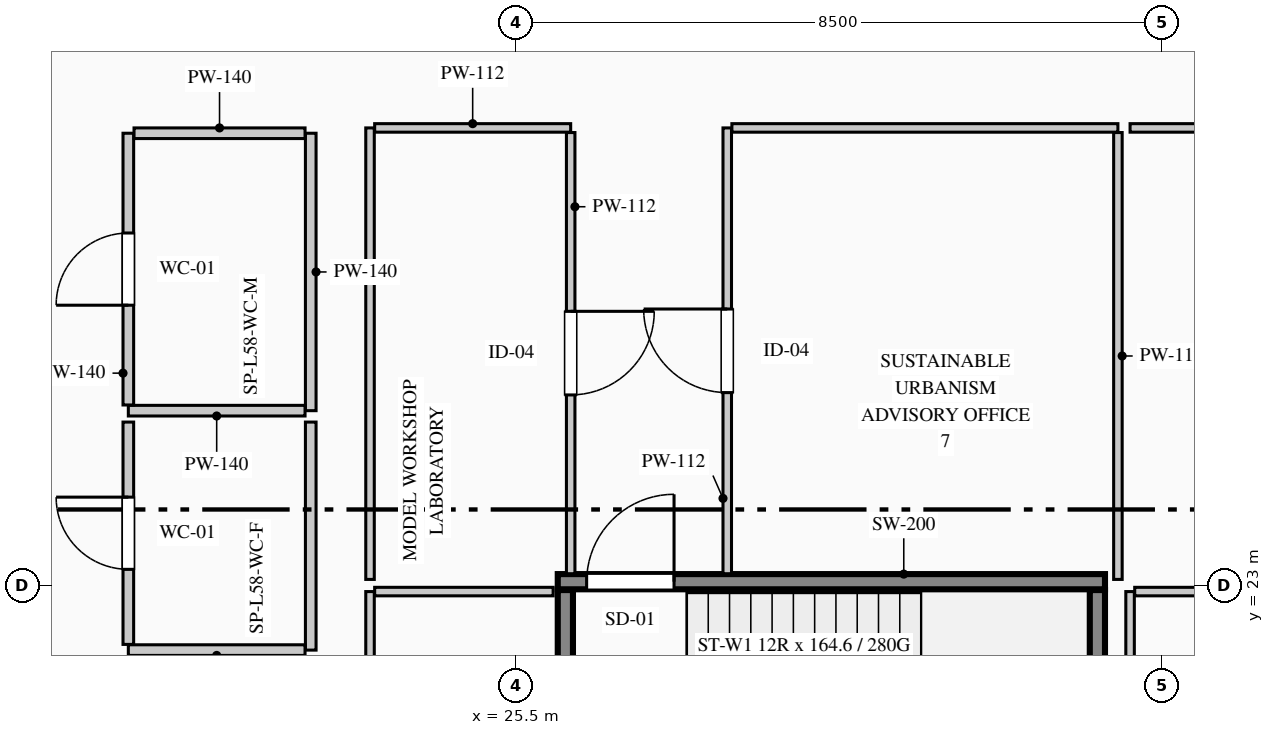
"""IFC4 building model, lengths in metres.
Left out: names, types, materials, properties, quantities, classifications, styles, units other than length and angle.
Written with IfcOpenShell. Run it as: python <this file> out.ifc"""

import sys

from ifc_helpers import new_model, si_unit, direction, frame, frame_2d, origin, place, context, subcontext, project, spatial, rectangle, extrude, element, fill, save


model = new_model("IFC4")
c1 = context("Model", 3, precision=1e-05, world=origin(), true_north=direction((0.0, 1.0)))
c2 = subcontext(c1, "Body", "Model", "MODEL_VIEW")
j1 = project(units=[si_unit("LENGTHUNIT", "METRE"), si_unit("PLANEANGLEUNIT", "RADIAN")], contexts=[c1])
p1 = place(None, origin())
s1 = spatial("IfcSite", under=j1, at=p1, CompositionType="ELEMENT")
p2 = place(p1, origin())
s2 = spatial("IfcBuilding", under=s1, at=p2, CompositionType="ELEMENT")
p3 = place(p2, frame((0.0, 0.0, 243.0)))
s3 = spatial("IfcBuildingStorey", under=s2, at=p3, CompositionType="ELEMENT", Elevation=243.0)
p4 = place(p3, frame((26.05, 23.05, 0.0), z_axis=(0.0, 0.0, 1.0), x_axis=(1.0, 0.0, 0.0)))
e1 = element("IfcWall", 1, at=p4, inside=s3, PredefinedType="SHEAR", context=c2, shape_type="SweptSolid", body=[
    extrude(rectangle(XDim=7.2, YDim=0.2, at=frame_2d((3.6, 0.0))), origin(), (0.0, 0.0, 1.0), 3.95),
])
p5 = place(p4, frame((0.38, 0.0, 0.0)))
e2 = element("IfcOpeningElement", 2, at=p5, cuts=e1, PredefinedType="OPENING", context=c2, shape_type="SweptSolid", body=[
    extrude(rectangle(XDim=1.15, YDim=2.2, at=frame_2d((0.575, 1.1))), frame((0.0, 0.11, 0.0), z_axis=(0.0, -1.0, 0.0), x_axis=(1.0, 0.0, 0.0)), (0.0, 0.0, 1.0), 0.22),
])
for number, where, z_axis, x_axis in (
    (3, (26.15, 19.81, 0.0), (0.0, 0.0, 1.0), (0.0, 1.0, 0.0)),
    (4, (33.15, 19.81, 0.0), (0.0, 0.0, 1.0), (0.0, 1.0, 0.0)),
):
    element("IfcWall", number, at=place(p3, frame(where, z_axis=z_axis, x_axis=x_axis)), inside=s3, PredefinedType="SHEAR", context=c2, shape_type="SweptSolid", body=[
        extrude(rectangle(XDim=3.13, YDim=0.2, at=frame_2d((1.565, 0.0))), origin(), (0.0, 0.0, 1.0), 3.95),
    ])
p6 = place(p3, frame((22.8, 28.95, 0.0), z_axis=(0.0, 0.0, 1.0), x_axis=(0.0, -1.0, 0.0)))
e5 = element("IfcWall", 5, at=p6, inside=s3, PredefinedType="PARTITIONING", context=c2, shape_type="SweptSolid", body=[
    extrude(rectangle(XDim=3.65, YDim=0.14, at=frame_2d((1.825, 0.0))), origin(), (0.0, 0.0, 1.0), 3.385),
])
p7 = place(p3, frame((22.725, 25.3, 0.0), z_axis=(0.0, 0.0, 1.0), x_axis=(-1.0, 0.0, 0.0)))
e6 = element("IfcWall", 6, at=p7, inside=s3, PredefinedType="PARTITIONING", context=c2, shape_type="SweptSolid", body=[
    extrude(rectangle(XDim=2.325, YDim=0.14, at=frame_2d((1.163, 0.0))), origin(), (0.0, 0.0, 1.0), 3.7),
])
p8 = place(p3, frame((20.4, 25.375, 0.0), z_axis=(0.0, 0.0, 1.0), x_axis=(0.0, 1.0, 0.0)))
e7 = element("IfcWall", 7, at=p8, inside=s3, PredefinedType="PARTITIONING", context=c2, shape_type="SweptSolid", body=[
    extrude(rectangle(XDim=3.575, YDim=0.14, at=frame_2d((1.788, 0.0))), origin(), (0.0, 0.0, 1.0), 3.7),
])
p9 = place(p8, frame((1.312, 0.0, 0.0)))
e8 = element("IfcOpeningElement", 8, at=p9, cuts=e7, PredefinedType="OPENING", context=c2, shape_type="SweptSolid", body=[
    extrude(rectangle(XDim=0.95, YDim=2.15, at=frame_2d((0.475, 1.075))), frame((0.0, 0.08, 0.0), z_axis=(0.0, -1.0, 0.0), x_axis=(1.0, 0.0, 0.0)), (0.0, 0.0, 1.0), 0.16),
])
p10 = place(p3, frame((20.475, 28.95, 0.0), z_axis=(0.0, 0.0, 1.0), x_axis=(1.0, 0.0, 0.0)))
e9 = element("IfcWall", 9, at=p10, inside=s3, PredefinedType="PARTITIONING", context=c2, shape_type="SweptSolid", body=[
    extrude(rectangle(XDim=2.25, YDim=0.14, at=frame_2d((1.125, 0.0))), origin(), (0.0, 0.0, 1.0), 3.7),
])
p11 = place(p3, frame((22.8, 25.15, 0.0), z_axis=(0.0, 0.0, 1.0), x_axis=(0.0, -1.0, 0.0)))
e10 = element("IfcWall", 10, at=p11, inside=s3, PredefinedType="PARTITIONING", context=c2, shape_type="SweptSolid", body=[
    extrude(rectangle(XDim=3.0, YDim=0.14, at=frame_2d((1.5, 0.0))), origin(), (0.0, 0.0, 1.0), 3.385),
])
p12 = place(p3, frame((22.725, 22.15, 0.0), z_axis=(0.0, 0.0, 1.0), x_axis=(-1.0, 0.0, 0.0)))
e11 = element("IfcWall", 11, at=p12, inside=s3, PredefinedType="PARTITIONING", context=c2, shape_type="SweptSolid", body=[
    extrude(rectangle(XDim=2.325, YDim=0.14, at=frame_2d((1.163, 0.0))), origin(), (0.0, 0.0, 1.0), 3.7),
])
p13 = place(p3, frame((20.4, 22.225, 0.0), z_axis=(0.0, 0.0, 1.0), x_axis=(0.0, 1.0, 0.0)))
e12 = element("IfcWall", 12, at=p13, inside=s3, PredefinedType="PARTITIONING", context=c2, shape_type="SweptSolid", body=[
    extrude(rectangle(XDim=2.925, YDim=0.14, at=frame_2d((1.462, 0.0))), origin(), (0.0, 0.0, 1.0), 3.7),
])
p14 = place(p13, frame((0.988, 0.0, 0.0)))
e13 = element("IfcOpeningElement", 13, at=p14, cuts=e12, PredefinedType="OPENING", context=c2, shape_type="SweptSolid", body=[
    extrude(rectangle(XDim=0.95, YDim=2.15, at=frame_2d((0.475, 1.075))), frame((0.0, 0.08, 0.0), z_axis=(0.0, -1.0, 0.0), x_axis=(1.0, 0.0, 0.0)), (0.0, 0.0, 1.0), 0.16),
])
p15 = place(p3, frame((33.58, 19.671, 0.0), z_axis=(0.0, 0.0, 1.0), x_axis=(0.0, 1.0, 0.0)))
e14 = element("IfcWall", 14, at=p15, inside=s3, PredefinedType="PARTITIONING", context=c2, shape_type="SweptSolid", body=[
    extrude(rectangle(XDim=3.249, YDim=0.112, at=frame_2d((1.625, 0.0))), origin(), (0.0, 0.0, 1.0), 3.7),
])
p16 = place(p3, frame((33.641, 22.92, 0.0), z_axis=(0.0, 0.0, 1.0), x_axis=(1.0, 0.0, 0.0)))
e15 = element("IfcWall", 15, at=p16, inside=s3, PredefinedType="PARTITIONING", context=c2, shape_type="SweptSolid", body=[
    extrude(rectangle(XDim=5.487, YDim=0.112, at=frame_2d((2.744, 0.0))), origin(), (0.0, 0.0, 1.0), 3.7),
])
p17 = place(p3, frame((23.58, 19.171, 0.0), z_axis=(0.0, 0.0, 1.0), x_axis=(0.0, 1.0, 0.0)))
e16 = element("IfcWall", 16, at=p17, inside=s3, PredefinedType="PARTITIONING", context=c2, shape_type="SweptSolid", body=[
    extrude(rectangle(XDim=3.749, YDim=0.112, at=frame_2d((1.875, 0.0))), origin(), (0.0, 0.0, 1.0), 3.7),
])
p18 = place(p3, frame((23.641, 22.92, 0.0), z_axis=(0.0, 0.0, 1.0), x_axis=(1.0, 0.0, 0.0)))
e17 = element("IfcWall", 17, at=p18, inside=s3, PredefinedType="PARTITIONING", context=c2, shape_type="SweptSolid", body=[
    extrude(rectangle(XDim=2.348, YDim=0.112, at=frame_2d((1.174, 0.0))), origin(), (0.0, 0.0, 1.0), 3.7),
])
p19 = place(p3, frame((23.58, 23.08, 0.0), z_axis=(0.0, 0.0, 1.0), x_axis=(0.0, 1.0, 0.0)))
e18 = element("IfcWall", 18, at=p19, inside=s3, PredefinedType="PARTITIONING", context=c2, shape_type="SweptSolid", body=[
    extrude(rectangle(XDim=5.94, YDim=0.112, at=frame_2d((2.97, 0.0))), origin(), (0.0, 0.0, 1.0), 3.7),
])
p20 = place(p3, frame((23.641, 29.02, 0.0), z_axis=(0.0, 0.0, 1.0), x_axis=(1.0, 0.0, 0.0)))
e19 = element("IfcWall", 19, at=p20, inside=s3, PredefinedType="PARTITIONING", context=c2, shape_type="SweptSolid", body=[
    extrude(rectangle(XDim=2.579, YDim=0.112, at=frame_2d((1.29, 0.0))), origin(), (0.0, 0.0, 1.0), 3.385),
])
p21 = place(p3, frame((26.22, 28.959, 0.0), z_axis=(0.0, 0.0, 1.0), x_axis=(0.0, -1.0, 0.0)))
e20 = element("IfcWall", 20, at=p21, inside=s3, PredefinedType="PARTITIONING", context=c2, shape_type="SweptSolid", body=[
    extrude(rectangle(XDim=5.804, YDim=0.112, at=frame_2d((2.902, 0.0))), origin(), (0.0, 0.0, 1.0), 3.7),
])
p22 = place(p21, frame((2.352, 0.0, 0.0)))
e21 = element("IfcOpeningElement", 21, at=p22, cuts=e20, PredefinedType="OPENING", context=c2, shape_type="SweptSolid", body=[
    extrude(rectangle(XDim=1.1, YDim=2.2, at=frame_2d((0.55, 1.1))), frame((0.0, 0.066, 0.0), z_axis=(0.0, -1.0, 0.0), x_axis=(1.0, 0.0, 0.0)), (0.0, 0.0, 1.0), 0.132),
])
p23 = place(p3, frame((28.28, 23.155, 0.0), z_axis=(0.0, 0.0, 1.0), x_axis=(0.0, 1.0, 0.0)))
e22 = element("IfcWall", 22, at=p23, inside=s3, PredefinedType="PARTITIONING", context=c2, shape_type="SweptSolid", body=[
    extrude(rectangle(XDim=5.865, YDim=0.112, at=frame_2d((2.933, 0.0))), origin(), (0.0, 0.0, 1.0), 3.7),
])
p24 = place(p23, frame((2.383, 0.0, 0.0)))
e23 = element("IfcOpeningElement", 23, at=p24, cuts=e22, PredefinedType="OPENING", context=c2, shape_type="SweptSolid", body=[
    extrude(rectangle(XDim=1.1, YDim=2.2, at=frame_2d((0.55, 1.1))), frame((0.0, 0.066, 0.0), z_axis=(0.0, -1.0, 0.0), x_axis=(1.0, 0.0, 0.0)), (0.0, 0.0, 1.0), 0.132),
])
p25 = place(p3, frame((28.341, 29.02, 0.0), z_axis=(0.0, 0.0, 1.0), x_axis=(1.0, 0.0, 0.0)))
e24 = element("IfcWall", 24, at=p25, inside=s3, PredefinedType="PARTITIONING", context=c2, shape_type="SweptSolid", body=[
    extrude(rectangle(XDim=5.079, YDim=0.112, at=frame_2d((2.54, 0.0))), origin(), (0.0, 0.0, 1.0), 3.385),
])
p26 = place(p3, frame((33.42, 28.959, 0.0), z_axis=(0.0, 0.0, 1.0), x_axis=(0.0, -1.0, 0.0)))
e25 = element("IfcWall", 25, at=p26, inside=s3, PredefinedType="PARTITIONING", context=c2, shape_type="SweptSolid", body=[
    extrude(rectangle(XDim=5.879, YDim=0.112, at=frame_2d((2.939, 0.0))), origin(), (0.0, 0.0, 1.0), 3.7),
])
p27 = place(p3, frame((33.58, 29.02, 0.0), z_axis=(0.0, 0.0, 1.0), x_axis=(1.0, 0.0, 0.0)))
e26 = element("IfcWall", 26, at=p27, inside=s3, PredefinedType="PARTITIONING", context=c2, shape_type="SweptSolid", body=[
    extrude(rectangle(XDim=4.1, YDim=0.112, at=frame_2d((2.05, 0.0))), origin(), (0.0, 0.0, 1.0), 3.385),
])
p28 = place(p27, frame((1.5, 0.0, 0.0)))
e27 = element("IfcOpeningElement", 27, at=p28, cuts=e26, PredefinedType="OPENING", context=c2, shape_type="SweptSolid", body=[
    extrude(rectangle(XDim=1.1, YDim=2.2, at=frame_2d((0.55, 1.1))), frame((0.0, 0.066, 0.0), z_axis=(0.0, -1.0, 0.0), x_axis=(1.0, 0.0, 0.0)), (0.0, 0.0, 1.0), 0.132),
])
p29 = place(p5, origin())
e28 = element("IfcDoor", 28, at=p29, inside=s3, OperationType="SINGLE_SWING_RIGHT", PredefinedType="DOOR", context=c2, shape_type="SweptSolid", body=[
    extrude(rectangle(XDim=1.15, YDim=2.2, at=frame_2d((0.575, 1.1))), frame((0.0, 0.025, 0.0), z_axis=(0.0, -1.0, 0.0), x_axis=(1.0, 0.0, 0.0)), (0.0, 0.0, 1.0), 0.05),
])
fill(e2, e28)
p30 = place(p9, origin())
e29 = element("IfcDoor", 29, at=p30, inside=s3, OperationType="SINGLE_SWING_LEFT", PredefinedType="DOOR", context=c2, shape_type="SweptSolid", body=[
    extrude(rectangle(XDim=0.95, YDim=2.15, at=frame_2d((0.475, 1.075))), frame((0.0, 0.025, 0.0), z_axis=(0.0, -1.0, 0.0), x_axis=(1.0, 0.0, 0.0)), (0.0, 0.0, 1.0), 0.05),
])
fill(e8, e29)
p31 = place(p14, origin())
e30 = element("IfcDoor", 30, at=p31, inside=s3, OperationType="SINGLE_SWING_RIGHT", PredefinedType="DOOR", context=c2, shape_type="SweptSolid", body=[
    extrude(rectangle(XDim=0.95, YDim=2.15, at=frame_2d((0.475, 1.075))), frame((0.0, 0.025, 0.0), z_axis=(0.0, -1.0, 0.0), x_axis=(1.0, 0.0, 0.0)), (0.0, 0.0, 1.0), 0.05),
])
fill(e13, e30)
p32 = place(p22, origin())
e31 = element("IfcDoor", 31, at=p32, inside=s3, OperationType="SINGLE_SWING_LEFT", PredefinedType="DOOR", context=c2, shape_type="SweptSolid", body=[
    extrude(rectangle(XDim=1.1, YDim=2.2, at=frame_2d((0.55, 1.1))), frame((0.0, 0.025, 0.0), z_axis=(0.0, -1.0, 0.0), x_axis=(1.0, 0.0, 0.0)), (0.0, 0.0, 1.0), 0.05),
])
fill(e21, e31)
p33 = place(p24, origin())
e32 = element("IfcDoor", 32, at=p33, inside=s3, OperationType="SINGLE_SWING_RIGHT", PredefinedType="DOOR", context=c2, shape_type="SweptSolid", body=[
    extrude(rectangle(XDim=1.1, YDim=2.2, at=frame_2d((0.55, 1.1))), frame((0.0, 0.025, 0.0), z_axis=(0.0, -1.0, 0.0), x_axis=(1.0, 0.0, 0.0)), (0.0, 0.0, 1.0), 0.05),
])
fill(e23, e32)
save(model, sys.argv[1])
